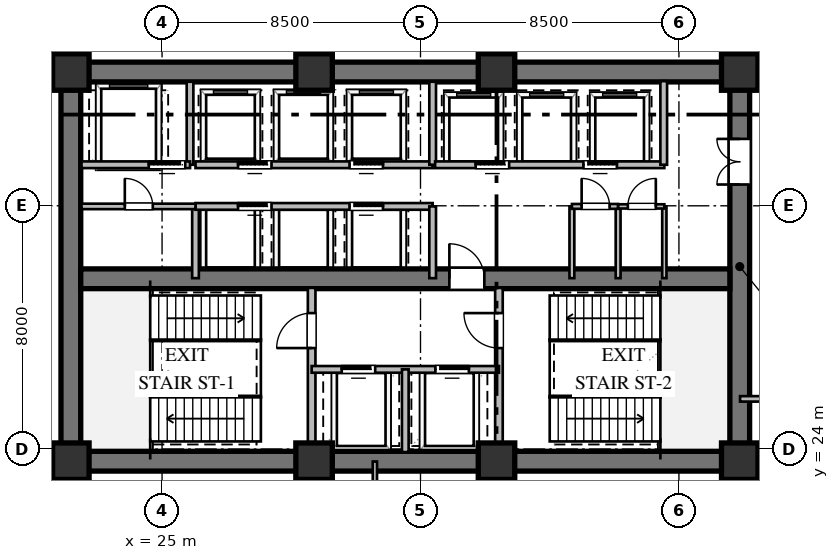
"""IFC4 building model, lengths in metres.
Left out: names, types, materials, properties, quantities, classifications, styles, units other than length and angle.
Written with IfcOpenShell. Run it as: python <this file> out.ifc"""

import sys

from ifc_helpers import new_model, si_unit, direction, frame, frame_2d, origin, origin_2d, place, context, subcontext, project, spatial, rectangle, extrude, element, fill, save


model = new_model("IFC4")
c1 = context("Model", 3, precision=1e-05, world=origin(), true_north=direction((0.0, 1.0)))
c2 = subcontext(c1, "Body", "Model", "MODEL_VIEW")
j1 = project(units=[si_unit("LENGTHUNIT", "METRE"), si_unit("PLANEANGLEUNIT", "RADIAN")], contexts=[c1])
p1 = place(None, origin())
s1 = spatial("IfcSite", under=j1, at=p1, CompositionType="ELEMENT")
p2 = place(p1, origin())
s2 = spatial("IfcBuilding", under=s1, at=p2, CompositionType="ELEMENT")
p3 = place(p2, origin())
s3 = spatial("IfcBuildingStorey", under=s2, at=p3, CompositionType="ELEMENT", Elevation=0.0)
for number, where, z_axis, x_axis in (
    (1, (21.675, 23.6, 0.0), (0.0, 0.0, 1.0), (1.0, 0.0, 0.0)),
    (2, (21.675, 36.4, 0.0), (0.0, 0.0, 1.0), (1.0, 0.0, 0.0)),
):
    element("IfcWall", number, at=place(p3, frame(where, z_axis=z_axis, x_axis=x_axis)), inside=s3, PredefinedType="SHEAR", context=c2, shape_type="SweptSolid", body=[
        extrude(rectangle(XDim=22.65, YDim=0.65, at=frame_2d((11.325, 0.0))), origin(), (0.0, 0.0, 1.0), 4.52),
    ])
p4 = place(p3, frame((22.0, 23.925, 0.0), z_axis=(0.0, 0.0, 1.0), x_axis=(0.0, 1.0, 0.0)))
e3 = element("IfcWall", 3, at=p4, inside=s3, PredefinedType="SHEAR", context=c2, shape_type="SweptSolid", body=[
    extrude(rectangle(XDim=12.15, YDim=0.65, at=frame_2d((6.075, 0.0))), origin(), (0.0, 0.0, 1.0), 4.52),
])
p5 = place(p3, frame((44.0, 23.925, 0.0), z_axis=(0.0, 0.0, 1.0), x_axis=(0.0, 1.0, 0.0)))
e4 = element("IfcWall", 4, at=p5, inside=s3, PredefinedType="SHEAR", context=c2, shape_type="SweptSolid", body=[
    extrude(rectangle(XDim=12.15, YDim=0.65, at=frame_2d((6.075, 0.0))), origin(), (0.0, 0.0, 1.0), 4.52),
])
p6 = place(p5, frame((8.775, 0.0, 0.0)))
e5 = element("IfcOpeningElement", 5, at=p6, cuts=e4, PredefinedType="OPENING", context=c2, shape_type="SweptSolid", body=[
    extrude(rectangle(XDim=1.5, YDim=2.15, at=frame_2d((0.75, 1.075))), frame((0.0, 0.335, 0.0), z_axis=(0.0, -1.0, 0.0), x_axis=(1.0, 0.0, 0.0)), (0.0, 0.0, 1.0), 0.67),
])
p7 = place(p3, frame((22.325, 29.6, 0.0), z_axis=(0.0, 0.0, 1.0), x_axis=(1.0, 0.0, 0.0)))
e6 = element("IfcWall", 6, at=p7, inside=s3, PredefinedType="SHEAR", context=c2, shape_type="SweptSolid", body=[
    extrude(rectangle(XDim=21.35, YDim=0.65, at=frame_2d((10.675, 0.0))), origin(), (0.0, 0.0, 1.0), 4.52),
])
p8 = place(p7, frame((12.125, 0.0, 0.0)))
e7 = element("IfcOpeningElement", 7, at=p8, cuts=e6, PredefinedType="OPENING", context=c2, shape_type="SweptSolid", body=[
    extrude(rectangle(XDim=1.15, YDim=2.1, at=frame_2d((0.575, 1.05))), frame((0.0, 0.335, 0.0), z_axis=(0.0, -1.0, 0.0), x_axis=(1.0, 0.0, 0.0)), (0.0, 0.0, 1.0), 0.67),
])
for number, where, z_axis, x_axis in (
    (8, (22.0, 23.6, 0.0), (0.0, 0.0, 1.0), (1.0, 0.0, 0.0)),
    (9, (30.0, 23.6, 0.0), (0.0, 0.0, 1.0), (1.0, 0.0, 0.0)),
    (10, (36.0, 23.6, 0.0), (0.0, 0.0, 1.0), (1.0, 0.0, 0.0)),
    (11, (44.0, 23.6, 0.0), (0.0, 0.0, 1.0), (1.0, 0.0, 0.0)),
    (12, (44.0, 36.4, 0.0), (0.0, 0.0, 1.0), (1.0, 0.0, 0.0)),
    (13, (36.0, 36.4, 0.0), (0.0, 0.0, 1.0), (1.0, 0.0, 0.0)),
    (14, (30.0, 36.4, 0.0), (0.0, 0.0, 1.0), (1.0, 0.0, 0.0)),
    (15, (22.0, 36.4, 0.0), (0.0, 0.0, 1.0), (1.0, 0.0, 0.0)),
):
    element("IfcColumn", number, at=place(p3, frame(where, z_axis=z_axis, x_axis=x_axis)), inside=s3, PredefinedType="COLUMN", context=c2, shape_type="SweptSolid", body=[
        extrude(rectangle(XDim=1.2, YDim=1.2, at=origin_2d()), origin(), (0.0, 0.0, 1.0), 4.8),
    ])
p9 = place(p3, frame((29.92, 23.9, 0.0), z_axis=(0.0, 0.0, 1.0), x_axis=(0.0, 1.0, 0.0)))
e16 = element("IfcWall", 16, at=p9, inside=s3, PredefinedType="SOLIDWALL", context=c2, shape_type="SweptSolid", body=[
    extrude(rectangle(XDim=5.4, YDim=0.25, at=frame_2d((2.7, 0.0))), origin(), (0.0, 0.0, 1.0), 4.52),
])
p10 = place(p9, frame((3.421, 0.0, 0.0)))
e17 = element("IfcOpeningElement", 17, at=p10, cuts=e16, PredefinedType="OPENING", context=c2, shape_type="SweptSolid", body=[
    extrude(rectangle(XDim=1.15, YDim=2.1, at=frame_2d((0.575, 1.05))), frame((0.0, 0.135, 0.0), z_axis=(0.0, -1.0, 0.0), x_axis=(1.0, 0.0, 0.0)), (0.0, 0.0, 1.0), 0.27),
])
p11 = place(p3, frame((36.08, 23.9, 0.0), z_axis=(0.0, 0.0, 1.0), x_axis=(0.0, 1.0, 0.0)))
e18 = element("IfcWall", 18, at=p11, inside=s3, PredefinedType="SOLIDWALL", context=c2, shape_type="SweptSolid", body=[
    extrude(rectangle(XDim=5.4, YDim=0.25, at=frame_2d((2.7, 0.0))), origin(), (0.0, 0.0, 1.0), 4.52),
])
p12 = place(p11, frame((3.421, 0.0, 0.0)))
e19 = element("IfcOpeningElement", 19, at=p12, cuts=e18, PredefinedType="OPENING", context=c2, shape_type="SweptSolid", body=[
    extrude(rectangle(XDim=1.15, YDim=2.1, at=frame_2d((0.575, 1.05))), frame((0.0, 0.135, 0.0), z_axis=(0.0, -1.0, 0.0), x_axis=(1.0, 0.0, 0.0)), (0.0, 0.0, 1.0), 0.27),
])
p13 = place(p3, frame((29.92, 26.62, 0.0), z_axis=(0.0, 0.0, 1.0), x_axis=(1.0, 0.0, 0.0)))
e20 = element("IfcWall", 20, at=p13, inside=s3, PredefinedType="SOLIDWALL", context=c2, shape_type="SweptSolid", body=[
    extrude(rectangle(XDim=6.16, YDim=0.22, at=frame_2d((3.08, 0.0))), origin(), (0.0, 0.0, 1.0), 4.52),
])
p14 = place(p13, frame((0.99, 0.0, 0.0)))
e21 = element("IfcOpeningElement", 21, at=p14, cuts=e20, PredefinedType="OPENING", context=c2, shape_type="SweptSolid", body=[
    extrude(rectangle(XDim=1.1, YDim=2.1, at=frame_2d((0.55, 1.05))), frame((0.0, 0.12, 0.0), z_axis=(0.0, -1.0, 0.0), x_axis=(1.0, 0.0, 0.0)), (0.0, 0.0, 1.0), 0.24),
])
p15 = place(p13, frame((4.07, 0.0, 0.0)))
e22 = element("IfcOpeningElement", 22, at=p15, cuts=e20, PredefinedType="OPENING", context=c2, shape_type="SweptSolid", body=[
    extrude(rectangle(XDim=1.1, YDim=2.1, at=frame_2d((0.55, 1.05))), frame((0.0, 0.12, 0.0), z_axis=(0.0, -1.0, 0.0), x_axis=(1.0, 0.0, 0.0)), (0.0, 0.0, 1.0), 0.24),
])
p16 = place(p3, frame((33.0, 23.9, 0.0), z_axis=(0.0, 0.0, 1.0), x_axis=(0.0, 1.0, 0.0)))
e23 = element("IfcWall", 23, at=p16, inside=s3, PredefinedType="SOLIDWALL", context=c2, shape_type="SweptSolid", body=[
    extrude(rectangle(XDim=2.72, YDim=0.22, at=frame_2d((1.36, 0.0))), origin(), (0.0, 0.0, 1.0), 4.52),
])
p17 = place(p3, frame((25.92, 33.35, 0.0), z_axis=(0.0, 0.0, 1.0), x_axis=(0.0, 1.0, 0.0)))
e24 = element("IfcWall", 24, at=p17, inside=s3, PredefinedType="SOLIDWALL", context=c2, shape_type="SweptSolid", body=[
    extrude(rectangle(XDim=2.73, YDim=0.22, at=frame_2d((1.365, 0.0))), origin(), (0.0, 0.0, 1.0), 4.52),
])
p18 = place(p3, frame((22.35, 33.35, 0.0), z_axis=(0.0, 0.0, 1.0), x_axis=(1.0, 0.0, 0.0)))
e25 = element("IfcWall", 25, at=p18, inside=s3, PredefinedType="SOLIDWALL", context=c2, shape_type="SweptSolid", body=[
    extrude(rectangle(XDim=3.57, YDim=0.22, at=frame_2d((1.785, 0.0))), origin(), (0.0, 0.0, 1.0), 4.52),
])
p19 = place(p18, frame((2.213, 0.0, 0.0)))
e26 = element("IfcOpeningElement", 26, at=p19, cuts=e25, PredefinedType="OPENING", context=c2, shape_type="SweptSolid", body=[
    extrude(rectangle(XDim=1.2, YDim=2.1, at=frame_2d((0.6, 1.05))), frame((0.0, 0.12, 0.0), z_axis=(0.0, -1.0, 0.0), x_axis=(1.0, 0.0, 0.0)), (0.0, 0.0, 1.0), 0.24),
])
p20 = place(p3, frame((26.1, 29.62, 0.0), z_axis=(0.0, 0.0, 1.0), x_axis=(0.0, 1.0, 0.0)))
e27 = element("IfcWall", 27, at=p20, inside=s3, PredefinedType="SOLIDWALL", context=c2, shape_type="SweptSolid", body=[
    extrude(rectangle(XDim=2.36, YDim=0.22, at=frame_2d((1.18, 0.0))), origin(), (0.0, 0.0, 1.0), 4.52),
])
p21 = place(p3, frame((26.1, 31.98, 0.0), z_axis=(0.0, 0.0, 1.0), x_axis=(1.0, 0.0, 0.0)))
e28 = element("IfcWall", 28, at=p21, inside=s3, PredefinedType="SOLIDWALL", context=c2, shape_type="SweptSolid", body=[
    extrude(rectangle(XDim=7.8, YDim=0.22, at=frame_2d((3.9, 0.0))), origin(), (0.0, 0.0, 1.0), 4.52),
])
p22 = place(p21, frame((1.4, 0.0, 0.0)))
e29 = element("IfcOpeningElement", 29, at=p22, cuts=e28, PredefinedType="OPENING", context=c2, shape_type="SweptSolid", body=[
    extrude(rectangle(XDim=1.1, YDim=2.1, at=frame_2d((0.55, 1.05))), frame((0.0, 0.12, 0.0), z_axis=(0.0, -1.0, 0.0), x_axis=(1.0, 0.0, 0.0)), (0.0, 0.0, 1.0), 0.24),
])
p23 = place(p21, frame((5.066, 0.0, 0.0)))
e30 = element("IfcOpeningElement", 30, at=p23, cuts=e28, PredefinedType="OPENING", context=c2, shape_type="SweptSolid", body=[
    extrude(rectangle(XDim=1.1, YDim=2.1, at=frame_2d((0.55, 1.05))), frame((0.0, 0.12, 0.0), z_axis=(0.0, -1.0, 0.0), x_axis=(1.0, 0.0, 0.0)), (0.0, 0.0, 1.0), 0.24),
])
p24 = place(p3, frame((33.9, 29.62, 0.0), z_axis=(0.0, 0.0, 1.0), x_axis=(0.0, 1.0, 0.0)))
e31 = element("IfcWall", 31, at=p24, inside=s3, PredefinedType="SOLIDWALL", context=c2, shape_type="SweptSolid", body=[
    extrude(rectangle(XDim=2.36, YDim=0.22, at=frame_2d((1.18, 0.0))), origin(), (0.0, 0.0, 1.0), 4.52),
])
p25 = place(p3, frame((26.1, 33.35, 0.0), z_axis=(0.0, 0.0, 1.0), x_axis=(1.0, 0.0, 0.0)))
e32 = element("IfcWall", 32, at=p25, inside=s3, PredefinedType="SOLIDWALL", context=c2, shape_type="SweptSolid", body=[
    extrude(rectangle(XDim=7.8, YDim=0.22, at=frame_2d((3.9, 0.0))), origin(), (0.0, 0.0, 1.0), 4.52),
])
p26 = place(p25, frame((1.4, 0.0, 0.0)))
e33 = element("IfcOpeningElement", 33, at=p26, cuts=e32, PredefinedType="OPENING", context=c2, shape_type="SweptSolid", body=[
    extrude(rectangle(XDim=1.1, YDim=2.1, at=frame_2d((0.55, 1.05))), frame((0.0, 0.12, 0.0), z_axis=(0.0, -1.0, 0.0), x_axis=(1.0, 0.0, 0.0)), (0.0, 0.0, 1.0), 0.24),
])
p27 = place(p25, frame((5.066, 0.0, 0.0)))
e34 = element("IfcOpeningElement", 34, at=p27, cuts=e32, PredefinedType="OPENING", context=c2, shape_type="SweptSolid", body=[
    extrude(rectangle(XDim=1.1, YDim=2.1, at=frame_2d((0.55, 1.05))), frame((0.0, 0.12, 0.0), z_axis=(0.0, -1.0, 0.0), x_axis=(1.0, 0.0, 0.0)), (0.0, 0.0, 1.0), 0.24),
])
p28 = place(p3, frame((33.9, 33.35, 0.0), z_axis=(0.0, 0.0, 1.0), x_axis=(0.0, 1.0, 0.0)))
e35 = element("IfcWall", 35, at=p28, inside=s3, PredefinedType="SOLIDWALL", context=c2, shape_type="SweptSolid", body=[
    extrude(rectangle(XDim=2.73, YDim=0.22, at=frame_2d((1.365, 0.0))), origin(), (0.0, 0.0, 1.0), 4.52),
])
p29 = place(p3, frame((33.98, 33.35, 0.0), z_axis=(0.0, 0.0, 1.0), x_axis=(1.0, 0.0, 0.0)))
e36 = element("IfcWall", 36, at=p29, inside=s3, PredefinedType="SOLIDWALL", context=c2, shape_type="SweptSolid", body=[
    extrude(rectangle(XDim=7.54, YDim=0.22, at=frame_2d((3.77, 0.0))), origin(), (0.0, 0.0, 1.0), 4.52),
])
p30 = place(p29, frame((1.335, 0.0, 0.0)))
e37 = element("IfcOpeningElement", 37, at=p30, cuts=e36, PredefinedType="OPENING", context=c2, shape_type="SweptSolid", body=[
    extrude(rectangle(XDim=1.1, YDim=2.1, at=frame_2d((0.55, 1.05))), frame((0.0, 0.12, 0.0), z_axis=(0.0, -1.0, 0.0), x_axis=(1.0, 0.0, 0.0)), (0.0, 0.0, 1.0), 0.24),
])
p31 = place(p29, frame((4.879, 0.0, 0.0)))
e38 = element("IfcOpeningElement", 38, at=p31, cuts=e36, PredefinedType="OPENING", context=c2, shape_type="SweptSolid", body=[
    extrude(rectangle(XDim=1.1, YDim=2.1, at=frame_2d((0.55, 1.05))), frame((0.0, 0.12, 0.0), z_axis=(0.0, -1.0, 0.0), x_axis=(1.0, 0.0, 0.0)), (0.0, 0.0, 1.0), 0.24),
])
p32 = place(p3, frame((41.5, 33.35, 0.0), z_axis=(0.0, 0.0, 1.0), x_axis=(0.0, 1.0, 0.0)))
e39 = element("IfcWall", 39, at=p32, inside=s3, PredefinedType="SOLIDWALL", context=c2, shape_type="SweptSolid", body=[
    extrude(rectangle(XDim=2.75, YDim=0.22, at=frame_2d((1.375, 0.0))), origin(), (0.0, 0.0, 1.0), 4.52),
])
p33 = place(p3, frame((22.35, 31.98, 0.0), z_axis=(0.0, 0.0, 1.0), x_axis=(1.0, 0.0, 0.0)))
e40 = element("IfcWall", 40, at=p33, inside=s3, PredefinedType="PARTITIONING", context=c2, shape_type="SweptSolid", body=[
    extrude(rectangle(XDim=3.75, YDim=0.18, at=frame_2d((1.875, 0.0))), origin(), (0.0, 0.0, 1.0), 4.52),
])
p34 = place(p33, frame((1.425, 0.0, 0.0)))
e41 = element("IfcOpeningElement", 41, at=p34, cuts=e40, PredefinedType="OPENING", context=c2, shape_type="SweptSolid", body=[
    extrude(rectangle(XDim=0.92, YDim=2.1, at=frame_2d((0.46, 1.05))), frame((0.0, 0.1, 0.0), z_axis=(0.0, -1.0, 0.0), x_axis=(1.0, 0.0, 0.0)), (0.0, 0.0, 1.0), 0.2),
])
for number, where, z_axis, x_axis in (
    (42, (38.48, 29.62, 0.0), (0.0, 0.0, 1.0), (0.0, 1.0, 0.0)),
    (43, (40.0, 29.62, 0.0), (0.0, 0.0, 1.0), (0.0, 1.0, 0.0)),
):
    element("IfcWall", number, at=place(p3, frame(where, z_axis=z_axis, x_axis=x_axis)), inside=s3, PredefinedType="PLUMBINGWALL", context=c2, shape_type="SweptSolid", body=[
        extrude(rectangle(XDim=2.36, YDim=0.16, at=frame_2d((1.18, 0.0))), origin(), (0.0, 0.0, 1.0), 4.52),
    ])
p35 = place(p3, frame((41.52, 29.62, 0.0), z_axis=(0.0, 0.0, 1.0), x_axis=(0.0, 1.0, 0.0)))
e44 = element("IfcWall", 44, at=p35, inside=s3, PredefinedType="PARTITIONING", context=c2, shape_type="SweptSolid", body=[
    extrude(rectangle(XDim=2.36, YDim=0.14, at=frame_2d((1.18, 0.0))), origin(), (0.0, 0.0, 1.0), 1.887),
])
p36 = place(p3, frame((38.48, 31.98, 0.0), z_axis=(0.0, 0.0, 1.0), x_axis=(1.0, 0.0, 0.0)))
e45 = element("IfcWall", 45, at=p36, inside=s3, PredefinedType="PLUMBINGWALL", context=c2, shape_type="SweptSolid", body=[
    extrude(rectangle(XDim=1.52, YDim=0.16, at=frame_2d((0.76, 0.0))), origin(), (0.0, 0.0, 1.0), 4.52),
])
p37 = place(p36, frame((0.32, 0.0, 0.0)))
e46 = element("IfcOpeningElement", 46, at=p37, cuts=e45, PredefinedType="OPENING", context=c2, shape_type="SweptSolid", body=[
    extrude(rectangle(XDim=0.92, YDim=2.1, at=frame_2d((0.46, 1.05))), frame((0.0, 0.09, 0.0), z_axis=(0.0, -1.0, 0.0), x_axis=(1.0, 0.0, 0.0)), (0.0, 0.0, 1.0), 0.18),
])
p38 = place(p3, frame((40.0, 31.98, 0.0), z_axis=(0.0, 0.0, 1.0), x_axis=(1.0, 0.0, 0.0)))
e47 = element("IfcWall", 47, at=p38, inside=s3, PredefinedType="PARTITIONING", context=c2, shape_type="SweptSolid", body=[
    extrude(rectangle(XDim=1.52, YDim=0.14, at=frame_2d((0.76, 0.0))), origin(), (0.0, 0.0, 1.0), 4.52),
])
p39 = place(p38, frame((0.32, 0.0, 0.0)))
e48 = element("IfcOpeningElement", 48, at=p39, cuts=e47, PredefinedType="OPENING", context=c2, shape_type="SweptSolid", body=[
    extrude(rectangle(XDim=0.92, YDim=2.1, at=frame_2d((0.46, 1.05))), frame((0.0, 0.08, 0.0), z_axis=(0.0, -1.0, 0.0), x_axis=(1.0, 0.0, 0.0)), (0.0, 0.0, 1.0), 0.16),
])
p40 = place(p3, frame((62.415, 25.65, 0.0), z_axis=(0.0, 0.0, 1.0), x_axis=(-1.0, 0.0, 0.0)))
e49 = element("IfcWall", 49, at=p40, inside=s3, PredefinedType="PARTITIONING", context=c2, shape_type="SweptSolid", body=[
    extrude(rectangle(XDim=18.405, YDim=0.18, at=frame_2d((9.203, 0.0))), origin(), (0.0, 0.0, 1.0), 3.966),
])
p41 = place(p40, frame((8.46, 0.0, 0.0)))
e50 = element("IfcOpeningElement", 50, at=p41, cuts=e49, PredefinedType="OPENING", context=c2, shape_type="SweptSolid", body=[
    extrude(rectangle(XDim=1.2, YDim=2.15, at=frame_2d((0.6, 1.075))), frame((0.0, 0.1, 0.0), z_axis=(0.0, -1.0, 0.0), x_axis=(1.0, 0.0, 0.0)), (0.0, 0.0, 1.0), 0.2),
])
p42 = place(p3, frame((21.675, 23.59, 0.0), z_axis=(0.0, 0.0, 1.0), x_axis=(0.0, -1.0, 0.0)))
e51 = element("IfcWall", 51, at=p42, inside=s3, PredefinedType="PARTITIONING", context=c2, shape_type="SweptSolid", body=[
    extrude(rectangle(XDim=3.62, YDim=0.18, at=frame_2d((1.81, 0.0))), origin(), (0.0, 0.0, 1.0), 3.66),
])
p43 = place(p3, frame((44.325, 5.272, 0.0), z_axis=(0.0, 0.0, 1.0), x_axis=(0.0, 1.0, 0.0)))
e52 = element("IfcWall", 52, at=p43, inside=s3, PredefinedType="PARTITIONING", context=c2, shape_type="SweptSolid", body=[
    extrude(rectangle(XDim=18.318, YDim=0.18, at=frame_2d((9.159, 0.0))), origin(), (0.0, 0.0, 1.0), 3.66),
])
p44 = place(p43, frame((8.349, 0.0, 0.0)))
e53 = element("IfcOpeningElement", 53, at=p44, cuts=e52, PredefinedType="OPENING", context=c2, shape_type="SweptSolid", body=[
    extrude(rectangle(XDim=1.2, YDim=2.15, at=frame_2d((0.6, 1.075))), frame((0.0, 0.1, 0.0), z_axis=(0.0, -1.0, 0.0), x_axis=(1.0, 0.0, 0.0)), (0.0, 0.0, 1.0), 0.2),
])
p45 = place(p3, frame((32.0, 23.59, 0.0), z_axis=(0.0, 0.0, 1.0), x_axis=(0.0, -1.0, 0.0)))
e54 = element("IfcWall", 54, at=p45, inside=s3, PredefinedType="PARTITIONING", context=c2, shape_type="SweptSolid", body=[
    extrude(rectangle(XDim=16.944, YDim=0.14, at=frame_2d((8.472, 0.0))), origin(), (0.0, 0.0, 1.0), 4.52),
])
p46 = place(p10, origin())
e55 = element("IfcDoor", 55, at=p46, inside=s3, OperationType="SINGLE_SWING_LEFT", PredefinedType="DOOR", context=c2, shape_type="SweptSolid", body=[
    extrude(rectangle(XDim=1.15, YDim=2.1, at=frame_2d((0.575, 1.05))), frame((0.0, 0.025, 0.0), z_axis=(0.0, -1.0, 0.0), x_axis=(1.0, 0.0, 0.0)), (0.0, 0.0, 1.0), 0.05),
])
fill(e17, e55)
p47 = place(p12, origin())
e56 = element("IfcDoor", 56, at=p47, inside=s3, OperationType="SINGLE_SWING_RIGHT", PredefinedType="DOOR", context=c2, shape_type="SweptSolid", body=[
    extrude(rectangle(XDim=1.15, YDim=2.1, at=frame_2d((0.575, 1.05))), frame((0.0, 0.025, 0.0), z_axis=(0.0, -1.0, 0.0), x_axis=(1.0, 0.0, 0.0)), (0.0, 0.0, 1.0), 0.05),
])
fill(e19, e56)
p48 = place(p14, origin())
e57 = element("IfcDoor", 57, at=p48, inside=s3, OperationType="SLIDING_TO_LEFT", PredefinedType="DOOR", context=c2, shape_type="SweptSolid", body=[
    extrude(rectangle(XDim=1.1, YDim=2.1, at=frame_2d((0.55, 1.05))), frame((0.0, 0.025, 0.0), z_axis=(0.0, -1.0, 0.0), x_axis=(1.0, 0.0, 0.0)), (0.0, 0.0, 1.0), 0.05),
])
fill(e21, e57)
p49 = place(p15, origin())
e58 = element("IfcDoor", 58, at=p49, inside=s3, OperationType="SLIDING_TO_RIGHT", PredefinedType="DOOR", context=c2, shape_type="SweptSolid", body=[
    extrude(rectangle(XDim=1.1, YDim=2.1, at=frame_2d((0.55, 1.05))), frame((0.0, 0.025, 0.0), z_axis=(0.0, -1.0, 0.0), x_axis=(1.0, 0.0, 0.0)), (0.0, 0.0, 1.0), 0.05),
])
fill(e22, e58)
p50 = place(p8, origin())
e59 = element("IfcDoor", 59, at=p50, inside=s3, OperationType="SINGLE_SWING_LEFT", PredefinedType="DOOR", context=c2, shape_type="SweptSolid", body=[
    extrude(rectangle(XDim=1.15, YDim=2.1, at=frame_2d((0.575, 1.05))), frame((0.0, 0.025, 0.0), z_axis=(0.0, -1.0, 0.0), x_axis=(1.0, 0.0, 0.0)), (0.0, 0.0, 1.0), 0.05),
])
fill(e7, e59)
p51 = place(p6, origin())
e60 = element("IfcDoor", 60, at=p51, inside=s3, OperationType="DOUBLE_DOOR_SINGLE_SWING", PredefinedType="DOOR", context=c2, shape_type="SweptSolid", body=[
    extrude(rectangle(XDim=1.5, YDim=2.15, at=frame_2d((0.75, 1.075))), frame((0.0, 0.025, 0.0), z_axis=(0.0, -1.0, 0.0), x_axis=(1.0, 0.0, 0.0)), (0.0, 0.0, 1.0), 0.05),
])
fill(e5, e60)
p52 = place(p19, origin())
e61 = element("IfcDoor", 61, at=p52, inside=s3, OperationType="SLIDING_TO_LEFT", PredefinedType="DOOR", context=c2, shape_type="SweptSolid", body=[
    extrude(rectangle(XDim=1.2, YDim=2.1, at=frame_2d((0.6, 1.05))), frame((0.0, 0.025, 0.0), z_axis=(0.0, -1.0, 0.0), x_axis=(1.0, 0.0, 0.0)), (0.0, 0.0, 1.0), 0.05),
])
fill(e26, e61)
p53 = place(p22, origin())
e62 = element("IfcDoor", 62, at=p53, inside=s3, OperationType="SLIDING_TO_LEFT", PredefinedType="DOOR", context=c2, shape_type="SweptSolid", body=[
    extrude(rectangle(XDim=1.1, YDim=2.1, at=frame_2d((0.55, 1.05))), frame((0.0, 0.025, 0.0), z_axis=(0.0, -1.0, 0.0), x_axis=(1.0, 0.0, 0.0)), (0.0, 0.0, 1.0), 0.05),
])
fill(e29, e62)
p54 = place(p23, origin())
e63 = element("IfcDoor", 63, at=p54, inside=s3, OperationType="SLIDING_TO_RIGHT", PredefinedType="DOOR", context=c2, shape_type="SweptSolid", body=[
    extrude(rectangle(XDim=1.1, YDim=2.1, at=frame_2d((0.55, 1.05))), frame((0.0, 0.025, 0.0), z_axis=(0.0, -1.0, 0.0), x_axis=(1.0, 0.0, 0.0)), (0.0, 0.0, 1.0), 0.05),
])
fill(e30, e63)
p55 = place(p26, origin())
e64 = element("IfcDoor", 64, at=p55, inside=s3, OperationType="SLIDING_TO_LEFT", PredefinedType="DOOR", context=c2, shape_type="SweptSolid", body=[
    extrude(rectangle(XDim=1.1, YDim=2.1, at=frame_2d((0.55, 1.05))), frame((0.0, 0.025, 0.0), z_axis=(0.0, -1.0, 0.0), x_axis=(1.0, 0.0, 0.0)), (0.0, 0.0, 1.0), 0.05),
])
fill(e33, e64)
p56 = place(p27, origin())
e65 = element("IfcDoor", 65, at=p56, inside=s3, OperationType="SLIDING_TO_RIGHT", PredefinedType="DOOR", context=c2, shape_type="SweptSolid", body=[
    extrude(rectangle(XDim=1.1, YDim=2.1, at=frame_2d((0.55, 1.05))), frame((0.0, 0.025, 0.0), z_axis=(0.0, -1.0, 0.0), x_axis=(1.0, 0.0, 0.0)), (0.0, 0.0, 1.0), 0.05),
])
fill(e34, e65)
p57 = place(p30, origin())
e66 = element("IfcDoor", 66, at=p57, inside=s3, OperationType="SLIDING_TO_LEFT", PredefinedType="DOOR", context=c2, shape_type="SweptSolid", body=[
    extrude(rectangle(XDim=1.1, YDim=2.1, at=frame_2d((0.55, 1.05))), frame((0.0, 0.025, 0.0), z_axis=(0.0, -1.0, 0.0), x_axis=(1.0, 0.0, 0.0)), (0.0, 0.0, 1.0), 0.05),
])
fill(e37, e66)
p58 = place(p31, origin())
e67 = element("IfcDoor", 67, at=p58, inside=s3, OperationType="SLIDING_TO_RIGHT", PredefinedType="DOOR", context=c2, shape_type="SweptSolid", body=[
    extrude(rectangle(XDim=1.1, YDim=2.1, at=frame_2d((0.55, 1.05))), frame((0.0, 0.025, 0.0), z_axis=(0.0, -1.0, 0.0), x_axis=(1.0, 0.0, 0.0)), (0.0, 0.0, 1.0), 0.05),
])
fill(e38, e67)
p59 = place(p34, origin())
e68 = element("IfcDoor", 68, at=p59, inside=s3, OperationType="SINGLE_SWING_LEFT", PredefinedType="DOOR", context=c2, shape_type="SweptSolid", body=[
    extrude(rectangle(XDim=0.92, YDim=2.1, at=frame_2d((0.46, 1.05))), frame((0.0, 0.025, 0.0), z_axis=(0.0, -1.0, 0.0), x_axis=(1.0, 0.0, 0.0)), (0.0, 0.0, 1.0), 0.05),
])
fill(e41, e68)
p60 = place(p37, origin())
e69 = element("IfcDoor", 69, at=p60, inside=s3, OperationType="SINGLE_SWING_LEFT", PredefinedType="DOOR", context=c2, shape_type="SweptSolid", body=[
    extrude(rectangle(XDim=0.92, YDim=2.1, at=frame_2d((0.46, 1.05))), frame((0.0, 0.025, 0.0), z_axis=(0.0, -1.0, 0.0), x_axis=(1.0, 0.0, 0.0)), (0.0, 0.0, 1.0), 0.05),
])
fill(e46, e69)
p61 = place(p39, origin())
e70 = element("IfcDoor", 70, at=p61, inside=s3, OperationType="SINGLE_SWING_RIGHT", PredefinedType="DOOR", context=c2, shape_type="SweptSolid", body=[
    extrude(rectangle(XDim=0.92, YDim=2.1, at=frame_2d((0.46, 1.05))), frame((0.0, 0.025, 0.0), z_axis=(0.0, -1.0, 0.0), x_axis=(1.0, 0.0, 0.0)), (0.0, 0.0, 1.0), 0.05),
])
fill(e48, e70)
save(model, sys.argv[1])
